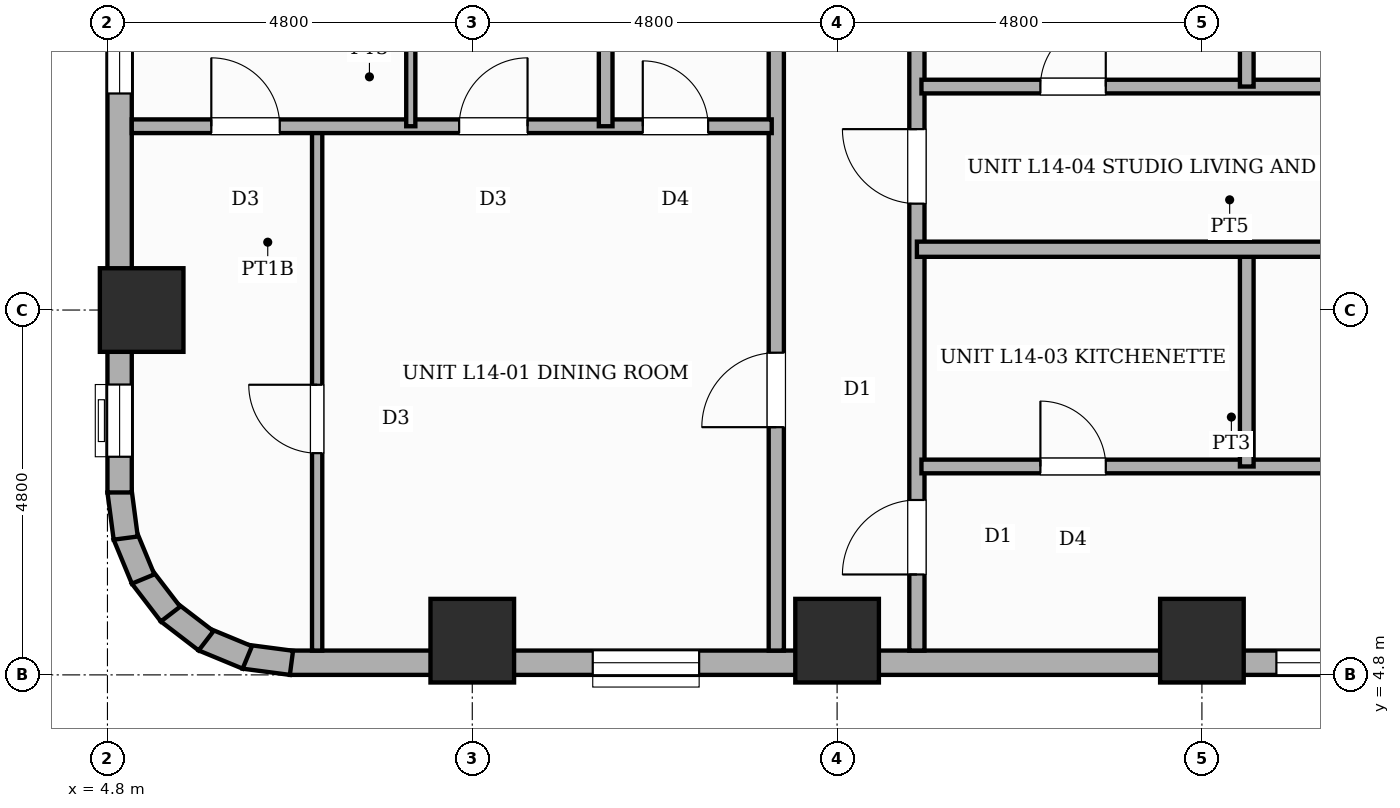
"""IFC4 building model, lengths in metres.
Left out: names, types, materials, properties, quantities, classifications, styles, units other than length and angle.
Written with IfcOpenShell. Run it as: python <this file> out.ifc"""

import sys

from ifc_helpers import new_model, si_unit, direction, frame, frame_2d, origin, origin_2d, place, context, subcontext, project, spatial, rectangle, extrude, element, fill, save


model = new_model("IFC4")
c1 = context("Model", 3, precision=1e-05, world=origin(), true_north=direction((0.0, 1.0)))
c2 = subcontext(c1, "Body", "Model", "MODEL_VIEW")
j1 = project(units=[si_unit("LENGTHUNIT", "METRE"), si_unit("PLANEANGLEUNIT", "RADIAN")], contexts=[c1])
p1 = place(None, origin())
s1 = spatial("IfcSite", under=j1, at=p1, CompositionType="ELEMENT")
p2 = place(p1, origin())
s2 = spatial("IfcBuilding", under=s1, at=p2, CompositionType="ELEMENT")
p3 = place(p2, frame((0.0, 0.0, 57.4)))
s3 = spatial("IfcBuildingStorey", under=s2, at=p3, CompositionType="ELEMENT", Elevation=57.4)
for number, where, z_axis, x_axis in (
    (1, (5.25, 9.6, 0.0), (0.0, 0.0, 1.0), (1.0, 0.0, 0.0)),
    (2, (9.6, 5.25, 0.0), (0.0, 0.0, 1.0), (1.0, 0.0, 0.0)),
    (3, (14.4, 5.25, 0.0), (0.0, 0.0, 1.0), (1.0, 0.0, 0.0)),
    (4, (19.2, 5.25, 0.0), (0.0, 0.0, 1.0), (1.0, 0.0, 0.0)),
):
    element("IfcColumn", number, at=place(p3, frame(where, z_axis=z_axis, x_axis=x_axis)), inside=s3, PredefinedType="COLUMN", context=c2, shape_type="SweptSolid", body=[
        extrude(rectangle(XDim=1.1, YDim=1.1, at=origin_2d()), origin(), (0.0, 0.0, 1.0), 3.6),
    ])
p4 = place(p3, frame((21.6, 4.96, 0.0), z_axis=(0.0, 0.0, 1.0), x_axis=(-1.0, 0.0, 0.0)))
e5 = element("IfcWall", 5, at=p4, inside=s3, PredefinedType="STANDARD", context=c2, shape_type="SweptSolid", body=[
    extrude(rectangle(XDim=14.4, YDim=0.32, at=frame_2d((7.2, 0.0))), origin(), (0.0, 0.0, 1.0), 2.53),
])
p5 = place(p4, frame((0.47, 0.0, 0.45)))
e6 = element("IfcOpeningElement", 6, at=p5, cuts=e5, PredefinedType="OPENING", context=c2, shape_type="SweptSolid", body=[
    extrude(rectangle(XDim=0.95, YDim=1.8, at=frame_2d((0.475, 0.9))), frame((0.0, 0.17, 0.0), z_axis=(0.0, -1.0, 0.0), x_axis=(1.0, 0.0, 0.0)), (0.0, 0.0, 1.0), 0.34),
])
p6 = place(p4, frame((9.015, 0.0, 0.65)))
e7 = element("IfcOpeningElement", 7, at=p6, cuts=e5, PredefinedType="OPENING", context=c2, shape_type="SweptSolid", body=[
    extrude(rectangle(XDim=1.4, YDim=1.1, at=frame_2d((0.7, 0.55))), frame((0.0, 0.17, 0.0), z_axis=(0.0, -1.0, 0.0), x_axis=(1.0, 0.0, 0.0)), (0.0, 0.0, 1.0), 0.34),
])
p7 = place(p3, frame((7.221, 4.958, 0.0), z_axis=(0.0, 0.0, 1.0), x_axis=(-0.991447664465, 0.130504898859, 0.0)))
e8 = element("IfcWall", 8, at=p7, inside=s3, PredefinedType="STANDARD", context=c2, shape_type="SweptSolid", body=[
    extrude(rectangle(XDim=0.627, YDim=0.32, at=frame_2d((0.313, 0.0))), origin(), (0.0, 0.0, 1.0), 3.35),
])
p8 = place(p3, frame((6.64, 5.03, 0.0), z_axis=(0.0, 0.0, 1.0), x_axis=(-0.923836271867, 0.382787856107, 0.0)))
e9 = element("IfcWall", 9, at=p8, inside=s3, PredefinedType="STANDARD", context=c2, shape_type="SweptSolid", body=[
    extrude(rectangle(XDim=0.626, YDim=0.32, at=frame_2d((0.313, 0.0))), origin(), (0.0, 0.0, 1.0), 3.35),
])
for number, where, z_axis, x_axis in (
    (10, (6.097, 5.248, 0.0), (0.0, 0.0, 1.0), (-0.793, 0.609, 0.0)),
    (11, (5.63, 5.6, 0.0), (0.0, 0.0, 1.0), (-0.609, 0.793, 0.0)),
):
    element("IfcWall", number, at=place(p3, frame(where, z_axis=z_axis, x_axis=x_axis)), inside=s3, PredefinedType="STANDARD", context=c2, shape_type="SweptSolid", body=[
        extrude(rectangle(XDim=0.627, YDim=0.32, at=frame_2d((0.313, 0.0))), origin(), (0.0, 0.0, 1.0), 3.35),
    ])
p9 = place(p3, frame((5.269, 6.061, 0.0), z_axis=(0.0, 0.0, 1.0), x_axis=(-0.382787856107, 0.923836271867, 0.0)))
e12 = element("IfcWall", 12, at=p9, inside=s3, PredefinedType="STANDARD", context=c2, shape_type="SweptSolid", body=[
    extrude(rectangle(XDim=0.626, YDim=0.32, at=frame_2d((0.313, 0.0))), origin(), (0.0, 0.0, 1.0), 3.35),
])
p10 = place(p3, frame((5.04, 6.6, 0.0), z_axis=(0.0, 0.0, 1.0), x_axis=(-0.130504898859, 0.991447664465, 0.0)))
e13 = element("IfcWall", 13, at=p10, inside=s3, PredefinedType="STANDARD", context=c2, shape_type="SweptSolid", body=[
    extrude(rectangle(XDim=0.627, YDim=0.32, at=frame_2d((0.313, 0.0))), origin(), (0.0, 0.0, 1.0), 3.35),
])
p11 = place(p3, frame((4.96, 7.2, 0.0), z_axis=(0.0, 0.0, 1.0), x_axis=(0.0, 1.0, 0.0)))
e14 = element("IfcWall", 14, at=p11, inside=s3, PredefinedType="STANDARD", context=c2, shape_type="SweptSolid", body=[
    extrude(rectangle(XDim=38.4, YDim=0.32, at=frame_2d((19.2, 0.0))), origin(), (0.0, 0.0, 1.0), 2.53),
])
p12 = place(p11, frame((14.35, 0.0, 0.0)))
e15 = element("IfcOpeningElement", 15, at=p12, cuts=e14, PredefinedType="OPENING", context=c2, shape_type="SweptSolid", body=[
    extrude(rectangle(XDim=1.1, YDim=2.15, at=frame_2d((0.55, 1.075))), frame((0.0, 0.17, 0.0), z_axis=(0.0, -1.0, 0.0), x_axis=(1.0, 0.0, 0.0)), (0.0, 0.0, 1.0), 0.34),
])
p13 = place(p11, frame((5.249, 0.0, 0.45)))
e16 = element("IfcOpeningElement", 16, at=p13, cuts=e14, PredefinedType="OPENING", context=c2, shape_type="SweptSolid", body=[
    extrude(rectangle(XDim=0.95, YDim=1.8, at=frame_2d((0.475, 0.9))), frame((0.0, 0.17, 0.0), z_axis=(0.0, -1.0, 0.0), x_axis=(1.0, 0.0, 0.0)), (0.0, 0.0, 1.0), 0.34),
])
p14 = place(p11, frame((17.645, 0.0, 0.45)))
e17 = element("IfcOpeningElement", 17, at=p14, cuts=e14, PredefinedType="OPENING", context=c2, shape_type="SweptSolid", body=[
    extrude(rectangle(XDim=0.6, YDim=1.8, at=frame_2d((0.3, 0.9))), frame((0.0, 0.17, 0.0), z_axis=(0.0, -1.0, 0.0), x_axis=(1.0, 0.0, 0.0)), (0.0, 0.0, 1.0), 0.34),
])
p15 = place(p11, frame((0.47, 0.0, 0.45)))
e18 = element("IfcOpeningElement", 18, at=p15, cuts=e14, PredefinedType="OPENING", context=c2, shape_type="SweptSolid", body=[
    extrude(rectangle(XDim=0.95, YDim=1.8, at=frame_2d((0.475, 0.9))), frame((0.0, 0.17, 0.0), z_axis=(0.0, -1.0, 0.0), x_axis=(1.0, 0.0, 0.0)), (0.0, 0.0, 1.0), 0.34),
])
p16 = place(p11, frame((9.015, 0.0, 0.65)))
e19 = element("IfcOpeningElement", 19, at=p16, cuts=e14, PredefinedType="OPENING", context=c2, shape_type="SweptSolid", body=[
    extrude(rectangle(XDim=1.4, YDim=1.1, at=frame_2d((0.7, 0.55))), frame((0.0, 0.17, 0.0), z_axis=(0.0, -1.0, 0.0), x_axis=(1.0, 0.0, 0.0)), (0.0, 0.0, 1.0), 0.34),
])
p17 = place(p3, frame((13.6, 5.12, 0.0), z_axis=(0.0, 0.0, 1.0), x_axis=(0.0, 1.0, 0.0)))
e20 = element("IfcWall", 20, at=p17, inside=s3, PredefinedType="PARTITIONING", context=c2, shape_type="SweptSolid", body=[
    extrude(rectangle(XDim=20.63, YDim=0.2, at=frame_2d((10.315, 0.0))), origin(), (0.0, 0.0, 1.0), 3.35),
])
p18 = place(p17, frame((2.939, 0.0, 0.0)))
e21 = element("IfcOpeningElement", 21, at=p18, cuts=e20, PredefinedType="OPENING", context=c2, shape_type="SweptSolid", body=[
    extrude(rectangle(XDim=0.98, YDim=2.18, at=frame_2d((0.49, 1.09))), frame((0.0, 0.11, 0.0), z_axis=(0.0, -1.0, 0.0), x_axis=(1.0, 0.0, 0.0)), (0.0, 0.0, 1.0), 0.22),
])
p19 = place(p17, frame((12.576, 0.0, 0.0)))
e22 = element("IfcOpeningElement", 22, at=p19, cuts=e20, PredefinedType="OPENING", context=c2, shape_type="SweptSolid", body=[
    extrude(rectangle(XDim=0.98, YDim=2.18, at=frame_2d((0.49, 1.09))), frame((0.0, 0.11, 0.0), z_axis=(0.0, -1.0, 0.0), x_axis=(1.0, 0.0, 0.0)), (0.0, 0.0, 1.0), 0.22),
])
p20 = place(p3, frame((15.45, 5.12, 0.0), z_axis=(0.0, 0.0, 1.0), x_axis=(0.0, 1.0, 0.0)))
e23 = element("IfcWall", 23, at=p20, inside=s3, PredefinedType="PARTITIONING", context=c2, shape_type="SweptSolid", body=[
    extrude(rectangle(XDim=20.63, YDim=0.2, at=frame_2d((10.315, 0.0))), origin(), (0.0, 0.0, 1.0), 3.35),
])
p21 = place(p20, frame((1.001, 0.0, 0.0)))
e24 = element("IfcOpeningElement", 24, at=p21, cuts=e23, PredefinedType="OPENING", context=c2, shape_type="SweptSolid", body=[
    extrude(rectangle(XDim=0.98, YDim=2.18, at=frame_2d((0.49, 1.09))), frame((0.0, 0.11, 0.0), z_axis=(0.0, -1.0, 0.0), x_axis=(1.0, 0.0, 0.0)), (0.0, 0.0, 1.0), 0.22),
])
p22 = place(p20, frame((5.88, 0.0, 0.0)))
e25 = element("IfcOpeningElement", 25, at=p22, cuts=e23, PredefinedType="OPENING", context=c2, shape_type="SweptSolid", body=[
    extrude(rectangle(XDim=0.98, YDim=2.18, at=frame_2d((0.49, 1.09))), frame((0.0, 0.11, 0.0), z_axis=(0.0, -1.0, 0.0), x_axis=(1.0, 0.0, 0.0)), (0.0, 0.0, 1.0), 0.22),
])
p23 = place(p20, frame((11.28, 0.0, 0.0)))
e26 = element("IfcOpeningElement", 26, at=p23, cuts=e23, PredefinedType="OPENING", context=c2, shape_type="SweptSolid", body=[
    extrude(rectangle(XDim=0.98, YDim=2.18, at=frame_2d((0.49, 1.09))), frame((0.0, 0.11, 0.0), z_axis=(0.0, -1.0, 0.0), x_axis=(1.0, 0.0, 0.0)), (0.0, 0.0, 1.0), 0.22),
])
p24 = place(p20, frame((16.28, 0.0, 0.0)))
e27 = element("IfcOpeningElement", 27, at=p24, cuts=e23, PredefinedType="OPENING", context=c2, shape_type="SweptSolid", body=[
    extrude(rectangle(XDim=0.98, YDim=2.18, at=frame_2d((0.49, 1.09))), frame((0.0, 0.11, 0.0), z_axis=(0.0, -1.0, 0.0), x_axis=(1.0, 0.0, 0.0)), (0.0, 0.0, 1.0), 0.22),
])
p25 = place(p3, frame((7.559, 5.12, 0.0), z_axis=(0.0, 0.0, 1.0), x_axis=(0.0, 1.0, 0.0)))
e28 = element("IfcWall", 28, at=p25, inside=s3, PredefinedType="PARTITIONING", context=c2, shape_type="SweptSolid", body=[
    extrude(rectangle(XDim=6.898, YDim=0.135, at=frame_2d((3.449, 0.0))), origin(), (0.0, 0.0, 1.0), 3.35),
])
p26 = place(p25, frame((2.597, 0.0, 0.0)))
e29 = element("IfcOpeningElement", 29, at=p26, cuts=e28, PredefinedType="OPENING", context=c2, shape_type="SweptSolid", body=[
    extrude(rectangle(XDim=0.9, YDim=2.15, at=frame_2d((0.45, 1.075))), frame((0.0, 0.078, 0.0), z_axis=(0.0, -1.0, 0.0), x_axis=(1.0, 0.0, 0.0)), (0.0, 0.0, 1.0), 0.155),
])
p27 = place(p3, frame((5.12, 12.018, 0.0), z_axis=(0.0, 0.0, 1.0), x_axis=(1.0, 0.0, 0.0)))
e30 = element("IfcWall", 30, at=p27, inside=s3, PredefinedType="PLUMBINGWALL", context=c2, shape_type="SweptSolid", body=[
    extrude(rectangle(XDim=8.42, YDim=0.18, at=frame_2d((4.21, 0.0))), origin(), (0.0, 0.0, 1.0), 3.35),
])
p28 = place(p27, frame((1.046, 0.0, 0.0)))
e31 = element("IfcOpeningElement", 31, at=p28, cuts=e30, PredefinedType="OPENING", context=c2, shape_type="SweptSolid", body=[
    extrude(rectangle(XDim=0.9, YDim=2.15, at=frame_2d((0.45, 1.075))), frame((0.0, 0.1, 0.0), z_axis=(0.0, -1.0, 0.0), x_axis=(1.0, 0.0, 0.0)), (0.0, 0.0, 1.0), 0.2),
])
p29 = place(p27, frame((4.307, 0.0, 0.0)))
e32 = element("IfcOpeningElement", 32, at=p29, cuts=e30, PredefinedType="OPENING", context=c2, shape_type="SweptSolid", body=[
    extrude(rectangle(XDim=0.9, YDim=2.15, at=frame_2d((0.45, 1.075))), frame((0.0, 0.1, 0.0), z_axis=(0.0, -1.0, 0.0), x_axis=(1.0, 0.0, 0.0)), (0.0, 0.0, 1.0), 0.2),
])
p30 = place(p27, frame((6.723, 0.0, 0.0)))
e33 = element("IfcOpeningElement", 33, at=p30, cuts=e30, PredefinedType="OPENING", context=c2, shape_type="SweptSolid", body=[
    extrude(rectangle(XDim=0.86, YDim=2.1, at=frame_2d((0.43, 1.05))), frame((0.0, 0.1, 0.0), z_axis=(0.0, -1.0, 0.0), x_axis=(1.0, 0.0, 0.0)), (0.0, 0.0, 1.0), 0.2),
])
p31 = place(p3, frame((8.791, 12.018, 0.0), z_axis=(0.0, 0.0, 1.0), x_axis=(0.0, 1.0, 0.0)))
e34 = element("IfcWall", 34, at=p31, inside=s3, PredefinedType="PARTITIONING", context=c2, shape_type="SweptSolid", body=[
    extrude(rectangle(XDim=3.222, YDim=0.12, at=frame_2d((1.611, 0.0))), origin(), (0.0, 0.0, 1.0), 3.35),
])
p32 = place(p3, frame((11.355, 12.018, 0.0), z_axis=(0.0, 0.0, 1.0), x_axis=(0.0, 1.0, 0.0)))
e35 = element("IfcWall", 35, at=p32, inside=s3, PredefinedType="PLUMBINGWALL", context=c2, shape_type="SweptSolid", body=[
    extrude(rectangle(XDim=3.222, YDim=0.18, at=frame_2d((1.611, 0.0))), origin(), (0.0, 0.0, 1.0), 3.35),
])
p33 = place(p3, frame((15.51, 7.542, 0.0), z_axis=(0.0, 0.0, 1.0), x_axis=(1.0, 0.0, 0.0)))
e36 = element("IfcWall", 36, at=p33, inside=s3, PredefinedType="PLUMBINGWALL", context=c2, shape_type="SweptSolid", body=[
    extrude(rectangle(XDim=8.17, YDim=0.18, at=frame_2d((4.085, 0.0))), origin(), (0.0, 0.0, 1.0), 3.35),
])
p34 = place(p33, frame((1.565, 0.0, 0.0)))
e37 = element("IfcOpeningElement", 37, at=p34, cuts=e36, PredefinedType="OPENING", context=c2, shape_type="SweptSolid", body=[
    extrude(rectangle(XDim=0.86, YDim=2.1, at=frame_2d((0.43, 1.05))), frame((0.0, 0.1, 0.0), z_axis=(0.0, -1.0, 0.0), x_axis=(1.0, 0.0, 0.0)), (0.0, 0.0, 1.0), 0.2),
])
p35 = place(p33, frame((5.73, 0.0, 0.0)))
e38 = element("IfcOpeningElement", 38, at=p35, cuts=e36, PredefinedType="OPENING", context=c2, shape_type="SweptSolid", body=[
    extrude(rectangle(XDim=0.86, YDim=2.1, at=frame_2d((0.43, 1.05))), frame((0.0, 0.1, 0.0), z_axis=(0.0, -1.0, 0.0), x_axis=(1.0, 0.0, 0.0)), (0.0, 0.0, 1.0), 0.2),
])
p36 = place(p3, frame((19.79, 7.542, 0.0), z_axis=(0.0, 0.0, 1.0), x_axis=(0.0, 1.0, 0.0)))
e39 = element("IfcWall", 39, at=p36, inside=s3, PredefinedType="PLUMBINGWALL", context=c2, shape_type="SweptSolid", body=[
    extrude(rectangle(XDim=2.898, YDim=0.18, at=frame_2d((1.449, 0.0))), origin(), (0.0, 0.0, 1.0), 3.35),
])
p37 = place(p3, frame((15.45, 10.4, 0.0), z_axis=(0.0, 0.0, 1.0), x_axis=(1.0, 0.0, 0.0)))
e40 = element("IfcWall", 40, at=p37, inside=s3, PredefinedType="SOLIDWALL", context=c2, shape_type="SweptSolid", body=[
    extrude(rectangle(XDim=8.23, YDim=0.2, at=frame_2d((4.115, 0.0))), origin(), (0.0, 0.0, 1.0), 3.35),
])
p38 = place(p3, frame((15.51, 12.54, 0.0), z_axis=(0.0, 0.0, 1.0), x_axis=(1.0, 0.0, 0.0)))
e41 = element("IfcWall", 41, at=p38, inside=s3, PredefinedType="PLUMBINGWALL", context=c2, shape_type="SweptSolid", body=[
    extrude(rectangle(XDim=8.17, YDim=0.18, at=frame_2d((4.085, 0.0))), origin(), (0.0, 0.0, 1.0), 3.35),
])
p39 = place(p38, frame((1.565, 0.0, 0.0)))
e42 = element("IfcOpeningElement", 42, at=p39, cuts=e41, PredefinedType="OPENING", context=c2, shape_type="SweptSolid", body=[
    extrude(rectangle(XDim=0.86, YDim=2.1, at=frame_2d((0.43, 1.05))), frame((0.0, 0.1, 0.0), z_axis=(0.0, -1.0, 0.0), x_axis=(1.0, 0.0, 0.0)), (0.0, 0.0, 1.0), 0.2),
])
p40 = place(p38, frame((5.73, 0.0, 0.0)))
e43 = element("IfcOpeningElement", 43, at=p40, cuts=e41, PredefinedType="OPENING", context=c2, shape_type="SweptSolid", body=[
    extrude(rectangle(XDim=0.86, YDim=2.1, at=frame_2d((0.43, 1.05))), frame((0.0, 0.1, 0.0), z_axis=(0.0, -1.0, 0.0), x_axis=(1.0, 0.0, 0.0)), (0.0, 0.0, 1.0), 0.2),
])
p41 = place(p3, frame((19.79, 12.54, 0.0), z_axis=(0.0, 0.0, 1.0), x_axis=(0.0, 1.0, 0.0)))
e44 = element("IfcWall", 44, at=p41, inside=s3, PredefinedType="PLUMBINGWALL", context=c2, shape_type="SweptSolid", body=[
    extrude(rectangle(XDim=3.3, YDim=0.18, at=frame_2d((1.65, 0.0))), origin(), (0.0, 0.0, 1.0), 3.35),
])
p42 = place(p5, origin())
e45 = element("IfcWindow", 45, at=p42, inside=s3, PartitioningType="SINGLE_PANEL", PredefinedType="WINDOW", context=c2, shape_type="SweptSolid", body=[
    extrude(rectangle(XDim=0.95, YDim=1.8, at=frame_2d((0.475, 0.9))), frame((0.0, 0.03, 0.0), z_axis=(0.0, -1.0, 0.0), x_axis=(1.0, 0.0, 0.0)), (0.0, 0.0, 1.0), 0.06),
])
fill(e6, e45)
p43 = place(p6, origin())
e46 = element("IfcWindow", 46, at=p43, inside=s3, PartitioningType="SINGLE_PANEL", PredefinedType="WINDOW", context=c2, shape_type="SweptSolid", body=[
    extrude(rectangle(XDim=1.4, YDim=1.1, at=frame_2d((0.7, 0.55))), frame((0.0, 0.03, 0.0), z_axis=(0.0, -1.0, 0.0), x_axis=(1.0, 0.0, 0.0)), (0.0, 0.0, 1.0), 0.06),
])
fill(e7, e46)
p44 = place(p13, origin())
e47 = element("IfcWindow", 47, at=p44, inside=s3, PartitioningType="SINGLE_PANEL", PredefinedType="WINDOW", context=c2, shape_type="SweptSolid", body=[
    extrude(rectangle(XDim=0.95, YDim=1.8, at=frame_2d((0.475, 0.9))), frame((0.0, 0.03, 0.0), z_axis=(0.0, -1.0, 0.0), x_axis=(1.0, 0.0, 0.0)), (0.0, 0.0, 1.0), 0.06),
])
fill(e16, e47)
p45 = place(p15, origin())
e48 = element("IfcWindow", 48, at=p45, inside=s3, PartitioningType="SINGLE_PANEL", PredefinedType="WINDOW", context=c2, shape_type="SweptSolid", body=[
    extrude(rectangle(XDim=0.95, YDim=1.8, at=frame_2d((0.475, 0.9))), frame((0.0, 0.03, 0.0), z_axis=(0.0, -1.0, 0.0), x_axis=(1.0, 0.0, 0.0)), (0.0, 0.0, 1.0), 0.06),
])
fill(e18, e48)
p46 = place(p18, origin())
e49 = element("IfcDoor", 49, at=p46, inside=s3, OperationType="SINGLE_SWING_LEFT", PredefinedType="DOOR", context=c2, shape_type="SweptSolid", body=[
    extrude(rectangle(XDim=0.98, YDim=2.18, at=frame_2d((0.49, 1.09))), frame((0.0, 0.025, 0.0), z_axis=(0.0, -1.0, 0.0), x_axis=(1.0, 0.0, 0.0)), (0.0, 0.0, 1.0), 0.05),
])
fill(e21, e49)
p47 = place(p26, origin())
e50 = element("IfcDoor", 50, at=p47, inside=s3, OperationType="SINGLE_SWING_RIGHT", PredefinedType="DOOR", context=c2, shape_type="SweptSolid", body=[
    extrude(rectangle(XDim=0.9, YDim=2.15, at=frame_2d((0.45, 1.075))), frame((0.0, 0.025, 0.0), z_axis=(0.0, -1.0, 0.0), x_axis=(1.0, 0.0, 0.0)), (0.0, 0.0, 1.0), 0.05),
])
fill(e29, e50)
p48 = place(p28, origin())
e51 = element("IfcDoor", 51, at=p48, inside=s3, OperationType="SINGLE_SWING_LEFT", PredefinedType="DOOR", context=c2, shape_type="SweptSolid", body=[
    extrude(rectangle(XDim=0.9, YDim=2.15, at=frame_2d((0.45, 1.075))), frame((0.0, 0.025, 0.0), z_axis=(0.0, -1.0, 0.0), x_axis=(1.0, 0.0, 0.0)), (0.0, 0.0, 1.0), 0.05),
])
fill(e31, e51)
p49 = place(p29, origin())
e52 = element("IfcDoor", 52, at=p49, inside=s3, OperationType="SINGLE_SWING_RIGHT", PredefinedType="DOOR", context=c2, shape_type="SweptSolid", body=[
    extrude(rectangle(XDim=0.9, YDim=2.15, at=frame_2d((0.45, 1.075))), frame((0.0, 0.025, 0.0), z_axis=(0.0, -1.0, 0.0), x_axis=(1.0, 0.0, 0.0)), (0.0, 0.0, 1.0), 0.05),
])
fill(e32, e52)
p50 = place(p30, origin())
e53 = element("IfcDoor", 53, at=p50, inside=s3, OperationType="SINGLE_SWING_LEFT", PredefinedType="DOOR", context=c2, shape_type="SweptSolid", body=[
    extrude(rectangle(XDim=0.86, YDim=2.1, at=frame_2d((0.43, 1.05))), frame((0.0, 0.025, 0.0), z_axis=(0.0, -1.0, 0.0), x_axis=(1.0, 0.0, 0.0)), (0.0, 0.0, 1.0), 0.05),
])
fill(e33, e53)
p51 = place(p21, origin())
e54 = element("IfcDoor", 54, at=p51, inside=s3, OperationType="SINGLE_SWING_LEFT", PredefinedType="DOOR", context=c2, shape_type="SweptSolid", body=[
    extrude(rectangle(XDim=0.98, YDim=2.18, at=frame_2d((0.49, 1.09))), frame((0.0, 0.025, 0.0), z_axis=(0.0, -1.0, 0.0), x_axis=(1.0, 0.0, 0.0)), (0.0, 0.0, 1.0), 0.05),
])
fill(e24, e54)
p52 = place(p34, origin())
e55 = element("IfcDoor", 55, at=p52, inside=s3, OperationType="SINGLE_SWING_LEFT", PredefinedType="DOOR", context=c2, shape_type="SweptSolid", body=[
    extrude(rectangle(XDim=0.86, YDim=2.1, at=frame_2d((0.43, 1.05))), frame((0.0, 0.025, 0.0), z_axis=(0.0, -1.0, 0.0), x_axis=(1.0, 0.0, 0.0)), (0.0, 0.0, 1.0), 0.05),
])
fill(e37, e55)
p53 = place(p22, origin())
e56 = element("IfcDoor", 56, at=p53, inside=s3, OperationType="SINGLE_SWING_RIGHT", PredefinedType="DOOR", context=c2, shape_type="SweptSolid", body=[
    extrude(rectangle(XDim=0.98, YDim=2.18, at=frame_2d((0.49, 1.09))), frame((0.0, 0.025, 0.0), z_axis=(0.0, -1.0, 0.0), x_axis=(1.0, 0.0, 0.0)), (0.0, 0.0, 1.0), 0.05),
])
fill(e25, e56)
p54 = place(p39, origin())
e57 = element("IfcDoor", 57, at=p54, inside=s3, OperationType="SINGLE_SWING_RIGHT", PredefinedType="DOOR", context=c2, shape_type="SweptSolid", body=[
    extrude(rectangle(XDim=0.86, YDim=2.1, at=frame_2d((0.43, 1.05))), frame((0.0, 0.025, 0.0), z_axis=(0.0, -1.0, 0.0), x_axis=(1.0, 0.0, 0.0)), (0.0, 0.0, 1.0), 0.05),
])
fill(e42, e57)
save(model, sys.argv[1])
